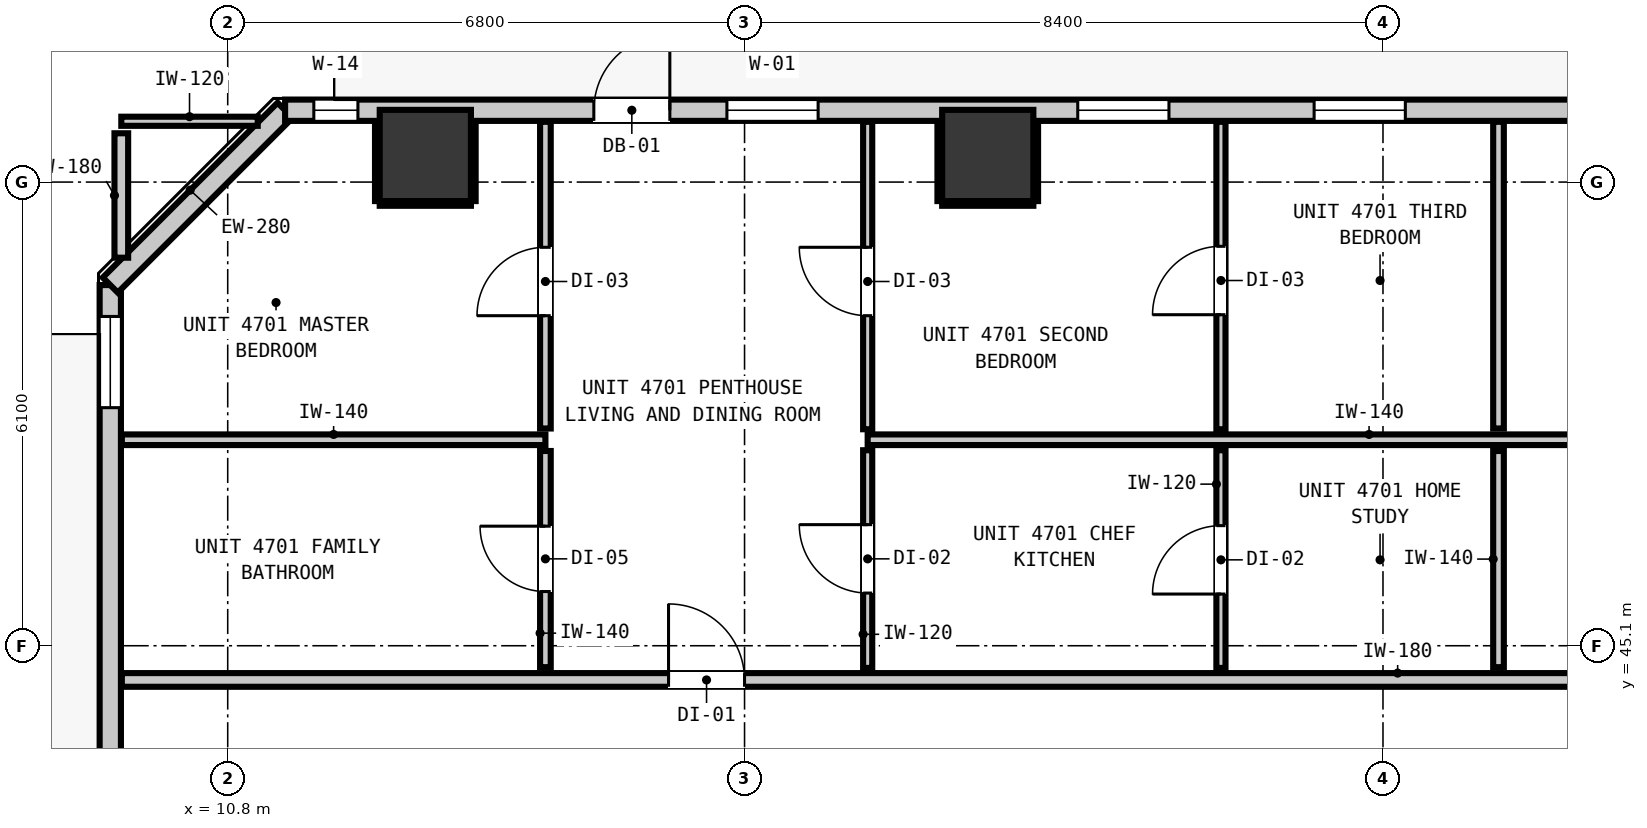
"""IFC4 building model, lengths in metres.
Left out: names, types, materials, properties, quantities, classifications, styles, units other than length and angle.
Written with IfcOpenShell. Run it as: python <this file> out.ifc"""

import sys

from ifc_helpers import new_model, si_unit, direction, frame, frame_2d, origin, origin_2d, place, context, subcontext, project, spatial, rectangle, extrude, element, fill, save


model = new_model("IFC4")
c1 = context("Model", 3, precision=1e-05, world=origin(), true_north=direction((0.0, 1.0)))
c2 = subcontext(c1, "Body", "Model", "MODEL_VIEW")
j1 = project(units=[si_unit("LENGTHUNIT", "METRE"), si_unit("PLANEANGLEUNIT", "RADIAN")], contexts=[c1])
p1 = place(None, origin())
s1 = spatial("IfcSite", under=j1, at=p1, CompositionType="ELEMENT")
p2 = place(p1, origin())
s2 = spatial("IfcBuilding", under=s1, at=p2, CompositionType="ELEMENT")
p3 = place(p2, frame((0.0, 0.0, 162.52)))
s3 = spatial("IfcBuildingStorey", under=s2, at=p3, CompositionType="ELEMENT", Elevation=162.52)
for number, where, z_axis, x_axis in (
    (1, (13.4, 51.55, 0.0), (0.0, 0.0, 1.0), (1.0, 0.0, 0.0)),
    (2, (20.8, 51.55, 0.0), (0.0, 0.0, 1.0), (1.0, 0.0, 0.0)),
):
    element("IfcColumn", number, at=place(p3, frame(where, z_axis=z_axis, x_axis=x_axis)), inside=s3, PredefinedType="COLUMN", context=c2, shape_type="SweptSolid", body=[
        extrude(rectangle(XDim=1.2, YDim=1.2, at=origin_2d()), origin(), (0.0, 0.0, 1.0), 2.9),
    ])
p4 = place(p3, frame((9.255, 17.555, 0.0), z_axis=(0.0, 0.0, 1.0), x_axis=(0.0, 1.0, 0.0)))
e3 = element("IfcWall", 3, at=p4, inside=s3, PredefinedType="STANDARD", context=c2, shape_type="SweptSolid", body=[
    extrude(rectangle(XDim=32.29, YDim=0.28, at=frame_2d((16.145, 0.0))), origin(), (0.0, 0.0, 1.0), 2.9),
])
p5 = place(p4, frame((5.467, 0.0, 0.0)))
e4 = element("IfcOpeningElement", 4, at=p5, cuts=e3, PredefinedType="OPENING", context=c2, shape_type="SweptSolid", body=[
    extrude(rectangle(XDim=1.0, YDim=2.15, at=frame_2d((0.5, 1.075))), frame((0.0, 0.15, 0.0), z_axis=(0.0, -1.0, 0.0), x_axis=(1.0, 0.0, 0.0)), (0.0, 0.0, 1.0), 0.3),
])
p6 = place(p4, frame((0.342, 0.0, 0.85)))
e5 = element("IfcOpeningElement", 5, at=p6, cuts=e3, PredefinedType="OPENING", context=c2, shape_type="SweptSolid", body=[
    extrude(rectangle(XDim=1.2, YDim=1.8, at=frame_2d((0.6, 0.9))), frame((0.0, 0.15, 0.0), z_axis=(0.0, -1.0, 0.0), x_axis=(1.0, 0.0, 0.0)), (0.0, 0.0, 1.0), 0.3),
])
p7 = place(p4, frame((30.677, 0.0, 0.85)))
e6 = element("IfcOpeningElement", 6, at=p7, cuts=e3, PredefinedType="OPENING", context=c2, shape_type="SweptSolid", body=[
    extrude(rectangle(XDim=1.2, YDim=1.8, at=frame_2d((0.6, 0.9))), frame((0.0, 0.15, 0.0), z_axis=(0.0, -1.0, 0.0), x_axis=(1.0, 0.0, 0.0)), (0.0, 0.0, 1.0), 0.3),
])
p8 = place(p3, frame((9.255, 49.845, 0.0), z_axis=(0.0, 0.0, 1.0), x_axis=(0.707106781187, 0.707106781187, 0.0)))
e7 = element("IfcWall", 7, at=p8, inside=s3, PredefinedType="STANDARD", context=c2, shape_type="SweptSolid", body=[
    extrude(rectangle(XDim=3.253, YDim=0.28, at=frame_2d((1.626, 0.0))), origin(), (0.0, 0.0, 1.0), 2.9),
])
p9 = place(p3, frame((11.555, 52.145, 0.0), z_axis=(0.0, 0.0, 1.0), x_axis=(1.0, 0.0, 0.0)))
e8 = element("IfcWall", 8, at=p9, inside=s3, PredefinedType="STANDARD", context=c2, shape_type="SweptSolid", body=[
    extrude(rectangle(XDim=35.09, YDim=0.28, at=frame_2d((17.545, 0.0))), origin(), (0.0, 0.0, 1.0), 2.9),
])
p10 = place(p9, frame((4.062, 0.0, 0.0)))
e9 = element("IfcOpeningElement", 9, at=p10, cuts=e8, PredefinedType="OPENING", context=c2, shape_type="SweptSolid", body=[
    extrude(rectangle(XDim=1.0, YDim=2.15, at=frame_2d((0.5, 1.075))), frame((0.0, 0.15, 0.0), z_axis=(0.0, -1.0, 0.0), x_axis=(1.0, 0.0, 0.0)), (0.0, 0.0, 1.0), 0.3),
])
p11 = place(p9, frame((5.813, 0.0, 0.85)))
e10 = element("IfcOpeningElement", 10, at=p11, cuts=e8, PredefinedType="OPENING", context=c2, shape_type="SweptSolid", body=[
    extrude(rectangle(XDim=1.2, YDim=1.8, at=frame_2d((0.6, 0.9))), frame((0.0, 0.15, 0.0), z_axis=(0.0, -1.0, 0.0), x_axis=(1.0, 0.0, 0.0)), (0.0, 0.0, 1.0), 0.3),
])
p12 = place(p9, frame((0.378, 0.0, 0.85)))
e11 = element("IfcOpeningElement", 11, at=p12, cuts=e8, PredefinedType="OPENING", context=c2, shape_type="SweptSolid", body=[
    extrude(rectangle(XDim=0.58, YDim=1.5, at=frame_2d((0.29, 0.75))), frame((0.0, 0.15, 0.0), z_axis=(0.0, -1.0, 0.0), x_axis=(1.0, 0.0, 0.0)), (0.0, 0.0, 1.0), 0.3),
])
p13 = place(p9, frame((10.429, 0.0, 0.85)))
e12 = element("IfcOpeningElement", 12, at=p13, cuts=e8, PredefinedType="OPENING", context=c2, shape_type="SweptSolid", body=[
    extrude(rectangle(XDim=1.2, YDim=1.8, at=frame_2d((0.6, 0.9))), frame((0.0, 0.15, 0.0), z_axis=(0.0, -1.0, 0.0), x_axis=(1.0, 0.0, 0.0)), (0.0, 0.0, 1.0), 0.3),
])
p14 = place(p9, frame((13.539, 0.0, 0.85)))
e13 = element("IfcOpeningElement", 13, at=p14, cuts=e8, PredefinedType="OPENING", context=c2, shape_type="SweptSolid", body=[
    extrude(rectangle(XDim=1.2, YDim=1.8, at=frame_2d((0.6, 0.9))), frame((0.0, 0.15, 0.0), z_axis=(0.0, -1.0, 0.0), x_axis=(1.0, 0.0, 0.0)), (0.0, 0.0, 1.0), 0.3),
])
p15 = place(p9, frame((22.052, 0.0, 0.85)))
e14 = element("IfcOpeningElement", 14, at=p15, cuts=e8, PredefinedType="OPENING", context=c2, shape_type="SweptSolid", body=[
    extrude(rectangle(XDim=1.2, YDim=1.8, at=frame_2d((0.6, 0.9))), frame((0.0, 0.15, 0.0), z_axis=(0.0, -1.0, 0.0), x_axis=(1.0, 0.0, 0.0)), (0.0, 0.0, 1.0), 0.3),
])
p16 = place(p9, frame((18.902, 0.0, 0.85)))
e15 = element("IfcOpeningElement", 15, at=p16, cuts=e8, PredefinedType="OPENING", context=c2, shape_type="SweptSolid", body=[
    extrude(rectangle(XDim=1.2, YDim=1.8, at=frame_2d((0.6, 0.9))), frame((0.0, 0.15, 0.0), z_axis=(0.0, -1.0, 0.0), x_axis=(1.0, 0.0, 0.0)), (0.0, 0.0, 1.0), 0.3),
])
p17 = place(p9, frame((29.444, 0.0, 0.85)))
e16 = element("IfcOpeningElement", 16, at=p17, cuts=e8, PredefinedType="OPENING", context=c2, shape_type="SweptSolid", body=[
    extrude(rectangle(XDim=1.2, YDim=1.8, at=frame_2d((0.6, 0.9))), frame((0.0, 0.15, 0.0), z_axis=(0.0, -1.0, 0.0), x_axis=(1.0, 0.0, 0.0)), (0.0, 0.0, 1.0), 0.3),
])
p18 = place(p9, frame((33.372, 0.0, 0.85)))
e17 = element("IfcOpeningElement", 17, at=p18, cuts=e8, PredefinedType="OPENING", context=c2, shape_type="SweptSolid", body=[
    extrude(rectangle(XDim=1.2, YDim=1.8, at=frame_2d((0.6, 0.9))), frame((0.0, 0.15, 0.0), z_axis=(0.0, -1.0, 0.0), x_axis=(1.0, 0.0, 0.0)), (0.0, 0.0, 1.0), 0.3),
])
p19 = place(p3, frame((9.407, 44.65, 0.0), z_axis=(0.0, 0.0, 1.0), x_axis=(1.0, 0.0, 0.0)))
e18 = element("IfcWall", 18, at=p19, inside=s3, PredefinedType="PARTITIONING", context=c2, shape_type="SweptSolid", body=[
    extrude(rectangle(XDim=39.386, YDim=0.18, at=frame_2d((19.693, 0.0))), origin(), (0.0, 0.0, 1.0), 2.9),
])
p20 = place(p19, frame((7.193, 0.0, 0.0)))
e19 = element("IfcOpeningElement", 19, at=p20, cuts=e18, PredefinedType="OPENING", context=c2, shape_type="SweptSolid", body=[
    extrude(rectangle(XDim=1.0, YDim=2.15, at=frame_2d((0.5, 1.075))), frame((0.0, 0.1, 0.0), z_axis=(0.0, -1.0, 0.0), x_axis=(1.0, 0.0, 0.0)), (0.0, 0.0, 1.0), 0.2),
])
p21 = place(p19, frame((25.379, 0.0, 0.0)))
e20 = element("IfcOpeningElement", 20, at=p21, cuts=e18, PredefinedType="OPENING", context=c2, shape_type="SweptSolid", body=[
    extrude(rectangle(XDim=1.0, YDim=2.15, at=frame_2d((0.5, 1.075))), frame((0.0, 0.1, 0.0), z_axis=(0.0, -1.0, 0.0), x_axis=(1.0, 0.0, 0.0)), (0.0, 0.0, 1.0), 0.2),
])
p22 = place(p3, frame((9.407, 47.81, 0.0), z_axis=(0.0, 0.0, 1.0), x_axis=(1.0, 0.0, 0.0)))
e21 = element("IfcWall", 21, at=p22, inside=s3, PredefinedType="PARTITIONING", context=c2, shape_type="SweptSolid", body=[
    extrude(rectangle(XDim=5.573, YDim=0.14, at=frame_2d((2.787, 0.0))), origin(), (0.0, 0.0, 1.0), 2.9),
])
p23 = place(p3, frame((19.22, 47.81, 0.0), z_axis=(0.0, 0.0, 1.0), x_axis=(1.0, 0.0, 0.0)))
e22 = element("IfcWall", 22, at=p23, inside=s3, PredefinedType="PARTITIONING", context=c2, shape_type="SweptSolid", body=[
    extrude(rectangle(XDim=13.194, YDim=0.14, at=frame_2d((6.597, 0.0))), origin(), (0.0, 0.0, 1.0), 2.9),
])
p24 = place(p3, frame((9.4, 52.0, 0.0), z_axis=(0.0, 0.0, 1.0), x_axis=(1.0, 0.0, 0.0)))
e23 = element("IfcWall", 23, at=p24, inside=s3, PredefinedType="PARTITIONING", context=c2, shape_type="SweptSolid", body=[
    extrude(rectangle(XDim=1.795, YDim=0.12, at=frame_2d((0.897, 0.0))), origin(), (0.0, 0.0, 1.0), 2.9),
])
p25 = place(p3, frame((9.4, 50.205, 0.0), z_axis=(0.0, 0.0, 1.0), x_axis=(0.0, 1.0, 0.0)))
e24 = element("IfcWall", 24, at=p25, inside=s3, PredefinedType="PARTITIONING", context=c2, shape_type="SweptSolid", body=[
    extrude(rectangle(XDim=1.637, YDim=0.18, at=frame_2d((0.818, 0.0))), origin(), (0.0, 0.0, 1.0), 2.9),
])
p26 = place(p3, frame((14.98, 44.818, 0.0), z_axis=(0.0, 0.0, 1.0), x_axis=(0.0, 1.0, 0.0)))
e25 = element("IfcWall", 25, at=p26, inside=s3, PredefinedType="PARTITIONING", context=c2, shape_type="SweptSolid", body=[
    extrude(rectangle(XDim=2.844, YDim=0.14, at=frame_2d((1.422, 0.0))), origin(), (0.0, 0.0, 1.0), 2.9),
])
p27 = place(p26, frame((0.995, 0.0, 0.0)))
e26 = element("IfcOpeningElement", 26, at=p27, cuts=e25, PredefinedType="OPENING", context=c2, shape_type="SweptSolid", body=[
    extrude(rectangle(XDim=0.86, YDim=2.02, at=frame_2d((0.43, 1.01))), frame((0.0, 0.08, 0.0), z_axis=(0.0, -1.0, 0.0), x_axis=(1.0, 0.0, 0.0)), (0.0, 0.0, 1.0), 0.16),
])
p28 = place(p3, frame((14.98, 47.958, 0.0), z_axis=(0.0, 0.0, 1.0), x_axis=(0.0, 1.0, 0.0)))
e27 = element("IfcWall", 27, at=p28, inside=s3, PredefinedType="PARTITIONING", context=c2, shape_type="SweptSolid", body=[
    extrude(rectangle(XDim=4.035, YDim=0.14, at=frame_2d((2.018, 0.0))), origin(), (0.0, 0.0, 1.0), 2.9),
])
p29 = place(p28, frame((1.484, 0.0, 0.0)))
e28 = element("IfcOpeningElement", 28, at=p29, cuts=e27, PredefinedType="OPENING", context=c2, shape_type="SweptSolid", body=[
    extrude(rectangle(XDim=0.9, YDim=2.1, at=frame_2d((0.45, 1.05))), frame((0.0, 0.08, 0.0), z_axis=(0.0, -1.0, 0.0), x_axis=(1.0, 0.0, 0.0)), (0.0, 0.0, 1.0), 0.16),
])
p30 = place(p3, frame((27.52, 44.818, 0.0), z_axis=(0.0, 0.0, 1.0), x_axis=(0.0, 1.0, 0.0)))
e29 = element("IfcWall", 29, at=p30, inside=s3, PredefinedType="PARTITIONING", context=c2, shape_type="SweptSolid", body=[
    extrude(rectangle(XDim=2.844, YDim=0.14, at=frame_2d((1.422, 0.0))), origin(), (0.0, 0.0, 1.0), 2.9),
])
p31 = place(p3, frame((27.52, 47.958, 0.0), z_axis=(0.0, 0.0, 1.0), x_axis=(0.0, 1.0, 0.0)))
e30 = element("IfcWall", 30, at=p31, inside=s3, PredefinedType="PARTITIONING", context=c2, shape_type="SweptSolid", body=[
    extrude(rectangle(XDim=4.035, YDim=0.14, at=frame_2d((2.018, 0.0))), origin(), (0.0, 0.0, 1.0), 2.9),
])
p32 = place(p3, frame((19.22, 44.808, 0.0), z_axis=(0.0, 0.0, 1.0), x_axis=(0.0, 1.0, 0.0)))
e31 = element("IfcWall", 31, at=p32, inside=s3, PredefinedType="PARTITIONING", context=c2, shape_type="SweptSolid", body=[
    extrude(rectangle(XDim=2.864, YDim=0.12, at=frame_2d((1.432, 0.0))), origin(), (0.0, 0.0, 1.0), 2.9),
])
p33 = place(p32, frame((0.985, 0.0, 0.0)))
e32 = element("IfcOpeningElement", 32, at=p33, cuts=e31, PredefinedType="OPENING", context=c2, shape_type="SweptSolid", body=[
    extrude(rectangle(XDim=0.9, YDim=2.1, at=frame_2d((0.45, 1.05))), frame((0.0, 0.07, 0.0), z_axis=(0.0, -1.0, 0.0), x_axis=(1.0, 0.0, 0.0)), (0.0, 0.0, 1.0), 0.14),
])
p34 = place(p3, frame((19.22, 47.948, 0.0), z_axis=(0.0, 0.0, 1.0), x_axis=(0.0, 1.0, 0.0)))
e33 = element("IfcWall", 33, at=p34, inside=s3, PredefinedType="PARTITIONING", context=c2, shape_type="SweptSolid", body=[
    extrude(rectangle(XDim=4.045, YDim=0.12, at=frame_2d((2.022, 0.0))), origin(), (0.0, 0.0, 1.0), 2.9),
])
p35 = place(p34, frame((1.494, 0.0, 0.0)))
e34 = element("IfcOpeningElement", 34, at=p35, cuts=e33, PredefinedType="OPENING", context=c2, shape_type="SweptSolid", body=[
    extrude(rectangle(XDim=0.9, YDim=2.1, at=frame_2d((0.45, 1.05))), frame((0.0, 0.07, 0.0), z_axis=(0.0, -1.0, 0.0), x_axis=(1.0, 0.0, 0.0)), (0.0, 0.0, 1.0), 0.14),
])
p36 = place(p3, frame((23.868, 44.808, 0.0), z_axis=(0.0, 0.0, 1.0), x_axis=(0.0, 1.0, 0.0)))
e35 = element("IfcWall", 35, at=p36, inside=s3, PredefinedType="PARTITIONING", context=c2, shape_type="SweptSolid", body=[
    extrude(rectangle(XDim=2.864, YDim=0.12, at=frame_2d((1.432, 0.0))), origin(), (0.0, 0.0, 1.0), 2.9),
])
p37 = place(p36, frame((0.972, 0.0, 0.0)))
e36 = element("IfcOpeningElement", 36, at=p37, cuts=e35, PredefinedType="OPENING", context=c2, shape_type="SweptSolid", body=[
    extrude(rectangle(XDim=0.9, YDim=2.1, at=frame_2d((0.45, 1.05))), frame((0.0, 0.07, 0.0), z_axis=(0.0, -1.0, 0.0), x_axis=(1.0, 0.0, 0.0)), (0.0, 0.0, 1.0), 0.14),
])
p38 = place(p3, frame((23.868, 47.948, 0.0), z_axis=(0.0, 0.0, 1.0), x_axis=(0.0, 1.0, 0.0)))
e37 = element("IfcWall", 37, at=p38, inside=s3, PredefinedType="PARTITIONING", context=c2, shape_type="SweptSolid", body=[
    extrude(rectangle(XDim=4.045, YDim=0.12, at=frame_2d((2.022, 0.0))), origin(), (0.0, 0.0, 1.0), 2.9),
])
p39 = place(p38, frame((1.507, 0.0, 0.0)))
e38 = element("IfcOpeningElement", 38, at=p39, cuts=e37, PredefinedType="OPENING", context=c2, shape_type="SweptSolid", body=[
    extrude(rectangle(XDim=0.9, YDim=2.1, at=frame_2d((0.45, 1.05))), frame((0.0, 0.07, 0.0), z_axis=(0.0, -1.0, 0.0), x_axis=(1.0, 0.0, 0.0)), (0.0, 0.0, 1.0), 0.14),
])
p40 = place(p3, frame((12.8, 50.918, 0.0), z_axis=(0.0, 0.0, 1.0), x_axis=(1.0, 0.0, 0.0)))
e39 = element("IfcWall", 39, at=p40, inside=s3, PredefinedType="PARTITIONING", context=c2, shape_type="SweptSolid", body=[
    extrude(rectangle(XDim=1.2, YDim=0.06, at=frame_2d((0.6, 0.0))), origin(), (0.0, 0.0, 1.0), 1.45),
])
for number, where, z_axis, x_axis in (
    (40, (12.768, 50.95, 0.0), (0.0, 0.0, 1.0), (0.0, 1.0, 0.0)),
    (41, (14.032, 50.95, 0.0), (0.0, 0.0, 1.0), (0.0, 1.0, 0.0)),
):
    element("IfcWall", number, at=place(p3, frame(where, z_axis=z_axis, x_axis=x_axis)), inside=s3, PredefinedType="PARTITIONING", context=c2, shape_type="SweptSolid", body=[
        extrude(rectangle(XDim=1.04, YDim=0.06, at=frame_2d((0.52, 0.0))), origin(), (0.0, 0.0, 1.0), 0.905),
    ])
p41 = place(p3, frame((20.2, 50.918, 0.0), z_axis=(0.0, 0.0, 1.0), x_axis=(1.0, 0.0, 0.0)))
e42 = element("IfcWall", 42, at=p41, inside=s3, PredefinedType="PARTITIONING", context=c2, shape_type="SweptSolid", body=[
    extrude(rectangle(XDim=1.2, YDim=0.06, at=frame_2d((0.6, 0.0))), origin(), (0.0, 0.0, 1.0), 1.45),
])
for number, where, z_axis, x_axis in (
    (43, (20.168, 50.95, 0.0), (0.0, 0.0, 1.0), (0.0, 1.0, 0.0)),
    (44, (21.432, 50.95, 0.0), (0.0, 0.0, 1.0), (0.0, 1.0, 0.0)),
):
    element("IfcWall", number, at=place(p3, frame(where, z_axis=z_axis, x_axis=x_axis)), inside=s3, PredefinedType="PARTITIONING", context=c2, shape_type="SweptSolid", body=[
        extrude(rectangle(XDim=1.04, YDim=0.06, at=frame_2d((0.52, 0.0))), origin(), (0.0, 0.0, 1.0), 0.905),
    ])
p42 = place(p10, origin())
e45 = element("IfcDoor", 45, at=p42, inside=s3, OperationType="SINGLE_SWING_RIGHT", PredefinedType="DOOR", context=c2, shape_type="SweptSolid", body=[
    extrude(rectangle(XDim=1.0, YDim=2.15, at=frame_2d((0.5, 1.075))), frame((0.0, 0.025, 0.0), z_axis=(0.0, -1.0, 0.0), x_axis=(1.0, 0.0, 0.0)), (0.0, 0.0, 1.0), 0.05),
])
fill(e9, e45)
p43 = place(p7, origin())
e46 = element("IfcWindow", 46, at=p43, inside=s3, PartitioningType="SINGLE_PANEL", PredefinedType="WINDOW", context=c2, shape_type="SweptSolid", body=[
    extrude(rectangle(XDim=1.2, YDim=1.8, at=frame_2d((0.6, 0.9))), frame((0.0, 0.03, 0.0), z_axis=(0.0, -1.0, 0.0), x_axis=(1.0, 0.0, 0.0)), (0.0, 0.0, 1.0), 0.06),
])
fill(e6, e46)
p44 = place(p11, origin())
e47 = element("IfcWindow", 47, at=p44, inside=s3, PartitioningType="SINGLE_PANEL", PredefinedType="WINDOW", context=c2, shape_type="SweptSolid", body=[
    extrude(rectangle(XDim=1.2, YDim=1.8, at=frame_2d((0.6, 0.9))), frame((0.0, 0.03, 0.0), z_axis=(0.0, -1.0, 0.0), x_axis=(1.0, 0.0, 0.0)), (0.0, 0.0, 1.0), 0.06),
])
fill(e10, e47)
p45 = place(p12, origin())
e48 = element("IfcWindow", 48, at=p45, inside=s3, PartitioningType="SINGLE_PANEL", PredefinedType="WINDOW", context=c2, shape_type="SweptSolid", body=[
    extrude(rectangle(XDim=0.58, YDim=1.5, at=frame_2d((0.29, 0.75))), frame((0.0, 0.03, 0.0), z_axis=(0.0, -1.0, 0.0), x_axis=(1.0, 0.0, 0.0)), (0.0, 0.0, 1.0), 0.06),
])
fill(e11, e48)
p46 = place(p13, origin())
e49 = element("IfcWindow", 49, at=p46, inside=s3, PartitioningType="SINGLE_PANEL", PredefinedType="WINDOW", context=c2, shape_type="SweptSolid", body=[
    extrude(rectangle(XDim=1.2, YDim=1.8, at=frame_2d((0.6, 0.9))), frame((0.0, 0.03, 0.0), z_axis=(0.0, -1.0, 0.0), x_axis=(1.0, 0.0, 0.0)), (0.0, 0.0, 1.0), 0.06),
])
fill(e12, e49)
p47 = place(p14, origin())
e50 = element("IfcWindow", 50, at=p47, inside=s3, PartitioningType="SINGLE_PANEL", PredefinedType="WINDOW", context=c2, shape_type="SweptSolid", body=[
    extrude(rectangle(XDim=1.2, YDim=1.8, at=frame_2d((0.6, 0.9))), frame((0.0, 0.03, 0.0), z_axis=(0.0, -1.0, 0.0), x_axis=(1.0, 0.0, 0.0)), (0.0, 0.0, 1.0), 0.06),
])
fill(e13, e50)
p48 = place(p20, origin())
e51 = element("IfcDoor", 51, at=p48, inside=s3, OperationType="SINGLE_SWING_LEFT", PredefinedType="DOOR", context=c2, shape_type="SweptSolid", body=[
    extrude(rectangle(XDim=1.0, YDim=2.15, at=frame_2d((0.5, 1.075))), frame((0.0, 0.025, 0.0), z_axis=(0.0, -1.0, 0.0), x_axis=(1.0, 0.0, 0.0)), (0.0, 0.0, 1.0), 0.05),
])
fill(e19, e51)
p49 = place(p27, origin())
e52 = element("IfcDoor", 52, at=p49, inside=s3, OperationType="SINGLE_SWING_RIGHT", PredefinedType="DOOR", context=c2, shape_type="SweptSolid", body=[
    extrude(rectangle(XDim=0.86, YDim=2.02, at=frame_2d((0.43, 1.01))), frame((0.0, 0.025, 0.0), z_axis=(0.0, -1.0, 0.0), x_axis=(1.0, 0.0, 0.0)), (0.0, 0.0, 1.0), 0.05),
])
fill(e26, e52)
p50 = place(p29, origin())
e53 = element("IfcDoor", 53, at=p50, inside=s3, OperationType="SINGLE_SWING_LEFT", PredefinedType="DOOR", context=c2, shape_type="SweptSolid", body=[
    extrude(rectangle(XDim=0.9, YDim=2.1, at=frame_2d((0.45, 1.05))), frame((0.0, 0.025, 0.0), z_axis=(0.0, -1.0, 0.0), x_axis=(1.0, 0.0, 0.0)), (0.0, 0.0, 1.0), 0.05),
])
fill(e28, e53)
p51 = place(p33, origin())
e54 = element("IfcDoor", 54, at=p51, inside=s3, OperationType="SINGLE_SWING_RIGHT", PredefinedType="DOOR", context=c2, shape_type="SweptSolid", body=[
    extrude(rectangle(XDim=0.9, YDim=2.1, at=frame_2d((0.45, 1.05))), frame((0.0, 0.025, 0.0), z_axis=(0.0, -1.0, 0.0), x_axis=(1.0, 0.0, 0.0)), (0.0, 0.0, 1.0), 0.05),
])
fill(e32, e54)
p52 = place(p37, origin())
e55 = element("IfcDoor", 55, at=p52, inside=s3, OperationType="SINGLE_SWING_LEFT", PredefinedType="DOOR", context=c2, shape_type="SweptSolid", body=[
    extrude(rectangle(XDim=0.9, YDim=2.1, at=frame_2d((0.45, 1.05))), frame((0.0, 0.025, 0.0), z_axis=(0.0, -1.0, 0.0), x_axis=(1.0, 0.0, 0.0)), (0.0, 0.0, 1.0), 0.05),
])
fill(e36, e55)
p53 = place(p35, origin())
e56 = element("IfcDoor", 56, at=p53, inside=s3, OperationType="SINGLE_SWING_RIGHT", PredefinedType="DOOR", context=c2, shape_type="SweptSolid", body=[
    extrude(rectangle(XDim=0.9, YDim=2.1, at=frame_2d((0.45, 1.05))), frame((0.0, 0.025, 0.0), z_axis=(0.0, -1.0, 0.0), x_axis=(1.0, 0.0, 0.0)), (0.0, 0.0, 1.0), 0.05),
])
fill(e34, e56)
p54 = place(p39, origin())
e57 = element("IfcDoor", 57, at=p54, inside=s3, OperationType="SINGLE_SWING_LEFT", PredefinedType="DOOR", context=c2, shape_type="SweptSolid", body=[
    extrude(rectangle(XDim=0.9, YDim=2.1, at=frame_2d((0.45, 1.05))), frame((0.0, 0.025, 0.0), z_axis=(0.0, -1.0, 0.0), x_axis=(1.0, 0.0, 0.0)), (0.0, 0.0, 1.0), 0.05),
])
fill(e38, e57)
save(model, sys.argv[1])
